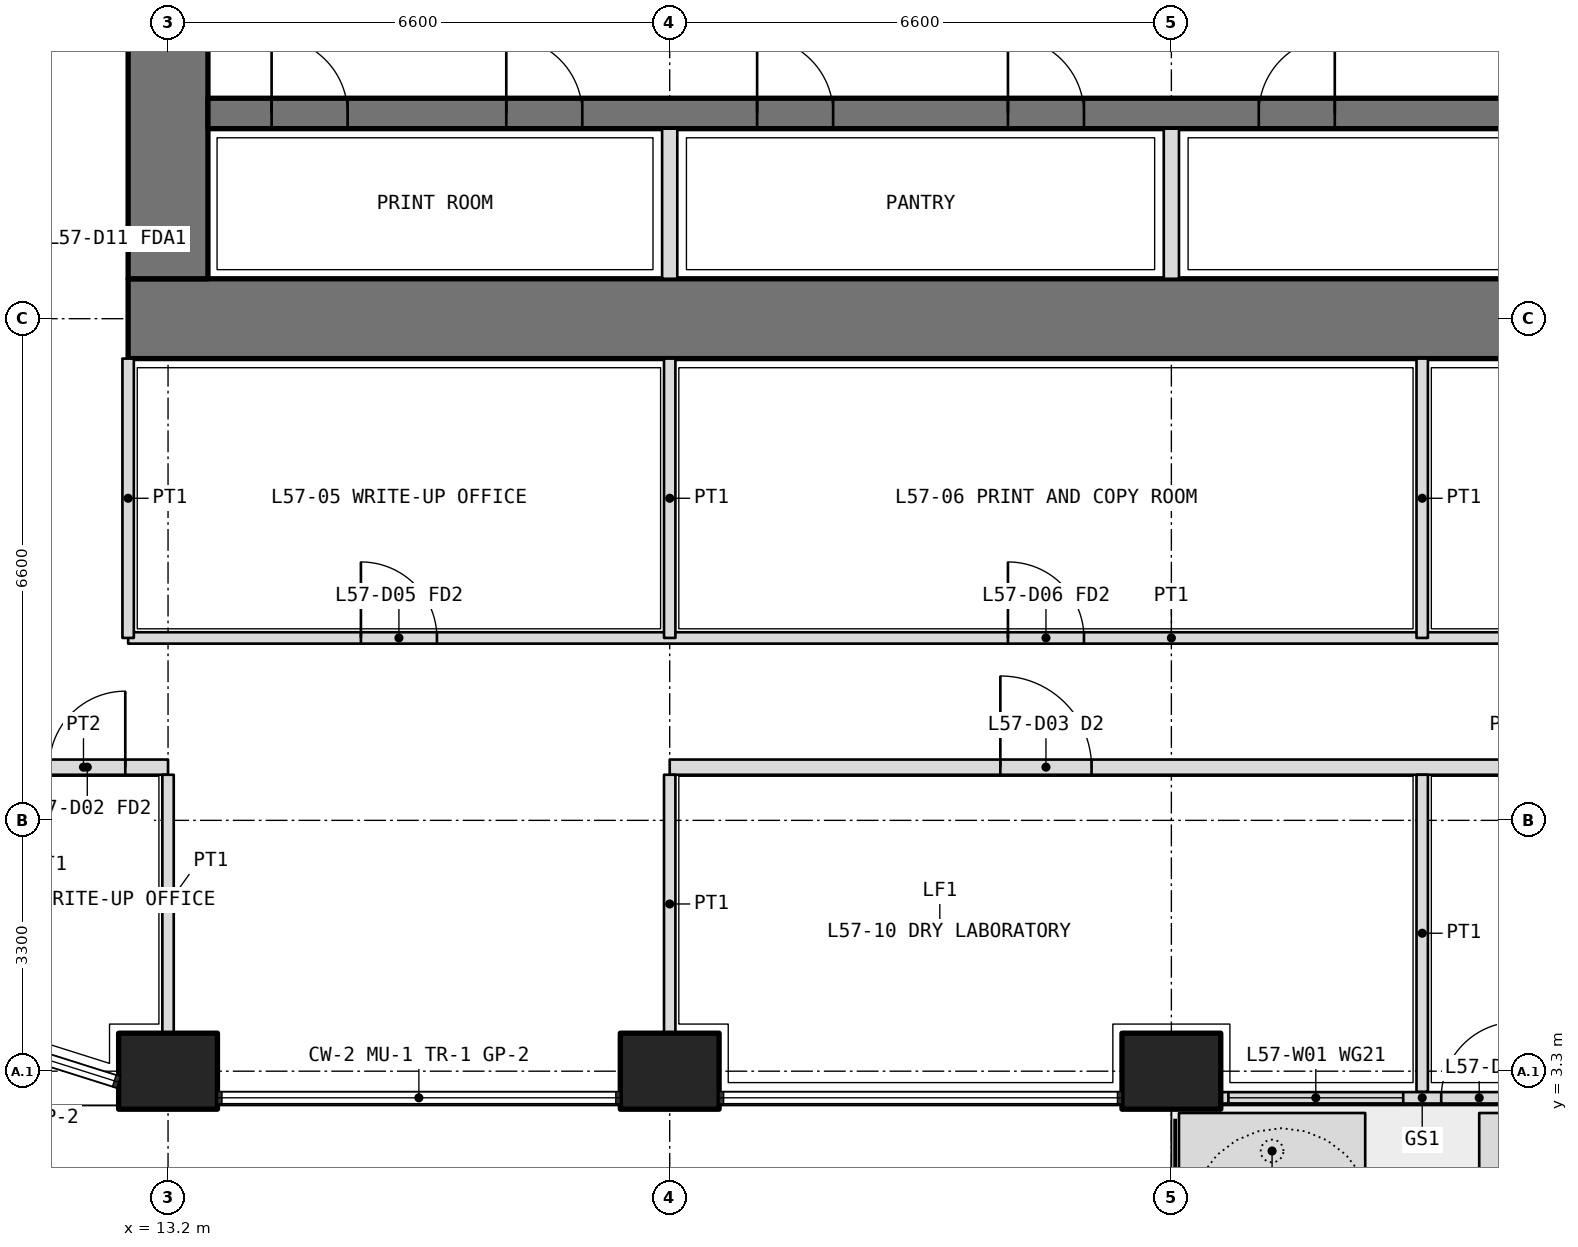
"""IFC4 building model, lengths in metres.
Left out: names, types, materials, properties, quantities, classifications, styles, units other than length and angle.
Written with IfcOpenShell. Run it as: python <this file> out.ifc"""

import sys

from ifc_helpers import new_model, si_unit, direction, frame, frame_2d, origin, origin_2d, place, context, subcontext, project, spatial, polyline, rectangle, outline, extrude, element, fill, save


model = new_model("IFC4")
c1 = context("Model", 3, precision=1e-05, world=origin(), true_north=direction((0.0, 1.0)))
c2 = subcontext(c1, "Body", "Model", "MODEL_VIEW")
j1 = project(units=[si_unit("LENGTHUNIT", "METRE"), si_unit("PLANEANGLEUNIT", "RADIAN")], contexts=[c1])
p1 = place(None, origin())
s1 = spatial("IfcSite", under=j1, at=p1, CompositionType="ELEMENT")
p2 = place(p1, origin())
s2 = spatial("IfcBuilding", under=s1, at=p2, CompositionType="ELEMENT")
p3 = place(p2, frame((0.0, 0.0, 250.2)))
s3 = spatial("IfcBuildingStorey", under=s2, at=p3, CompositionType="ELEMENT", Elevation=250.2)
for number, where, z_axis, x_axis in (
    (1, (13.2, 3.3, 0.0), (0.0, 0.0, 1.0), (1.0, 0.0, 0.0)),
    (2, (19.8, 3.3, 0.0), (0.0, 0.0, 1.0), (1.0, 0.0, 0.0)),
    (3, (26.4, 3.3, 0.0), (0.0, 0.0, 1.0), (1.0, 0.0, 0.0)),
):
    element("IfcColumn", number, at=place(p3, frame(where, z_axis=z_axis, x_axis=x_axis)), inside=s3, PredefinedType="COLUMN", context=c2, shape_type="SweptSolid", body=[
        extrude(rectangle(XDim=1.3, YDim=1.0, at=origin_2d()), origin(), (0.0, 0.0, 1.0), 4.2),
    ])
p4 = place(p3, origin())
e4 = element("IfcWall", 4, at=p4, inside=s3, PredefinedType="USERDEFINED", context=c2, shape_type="SweptSolid", body=[
    extrude(outline(polyline([(26.5, 1.75), (28.95, 1.75), (28.95, 2.75), (26.5, 2.75), (26.5, 1.75)]), holes=[polyline([(26.65, 1.9), (28.8, 1.9), (28.8, 2.6), (26.65, 2.6), (26.65, 1.9)])]), origin(), (0.0, 0.0, 1.0), 1.05),
])
p5 = place(p3, origin())
e5 = element("IfcWall", 5, at=p5, inside=s3, PredefinedType="USERDEFINED", context=c2, shape_type="SweptSolid", body=[
    extrude(outline(polyline([(30.45, 1.75), (39.5, 1.75), (39.5, 2.75), (30.45, 2.75), (30.45, 1.75)]), holes=[polyline([(30.6, 1.9), (39.35, 1.9), (39.35, 2.6), (30.6, 2.6), (30.6, 1.9)])]), origin(), (0.0, 0.0, 1.0), 1.05),
])
p6 = place(p3, frame((27.05, 2.95, 0.0), z_axis=(0.0, 0.0, 1.0), x_axis=(1.0, 0.0, 0.0)))
e6 = element("IfcWall", 6, at=p6, inside=s3, PredefinedType="SOLIDWALL", context=c2, shape_type="SweptSolid", body=[
    extrude(rectangle(XDim=5.3, YDim=0.15, at=frame_2d((2.65, 0.0))), origin(), (0.0, 0.0, 1.0), 2.7),
])
p7 = place(p6, frame((2.9, 0.0, 0.0)))
e7 = element("IfcOpeningElement", 7, at=p7, cuts=e6, PredefinedType="OPENING", context=c2, shape_type="SweptSolid", body=[
    extrude(rectangle(XDim=1.0, YDim=2.4, at=frame_2d((0.5, 1.2))), frame((0.0, 0.085, 0.0), z_axis=(0.0, -1.0, 0.0), x_axis=(1.0, 0.0, 0.0)), (0.0, 0.0, 1.0), 0.17),
])
p8 = place(p6, frame((0.1, 0.0, 0.1)))
e8 = element("IfcOpeningElement", 8, at=p8, cuts=e6, PredefinedType="OPENING", context=c2, shape_type="SweptSolid", body=[
    extrude(rectangle(XDim=2.3, YDim=2.3, at=frame_2d((1.15, 1.15))), frame((0.0, 0.085, 0.0), z_axis=(0.0, -1.0, 0.0), x_axis=(1.0, 0.0, 0.0)), (0.0, 0.0, 1.0), 0.17),
])
p9 = place(p6, frame((4.0, 0.0, 0.1)))
e9 = element("IfcOpeningElement", 9, at=p9, cuts=e6, PredefinedType="OPENING", context=c2, shape_type="SweptSolid", body=[
    extrude(rectangle(XDim=1.2, YDim=2.3, at=frame_2d((0.6, 1.15))), frame((0.0, 0.085, 0.0), z_axis=(0.0, -1.0, 0.0), x_axis=(1.0, 0.0, 0.0)), (0.0, 0.0, 1.0), 0.17),
])
p10 = place(p3, frame((12.675, 13.2, 0.0), z_axis=(0.0, 0.0, 1.0), x_axis=(1.0, 0.0, 0.0)))
e10 = element("IfcWall", 10, at=p10, inside=s3, PredefinedType="SHEAR", context=c2, shape_type="SweptSolid", body=[
    extrude(rectangle(XDim=27.45, YDim=1.05, at=frame_2d((13.725, 0.0))), origin(), (0.0, 0.0, 1.0), 4.2),
])
p11 = place(p3, frame((13.2, 32.475, 0.0), z_axis=(0.0, 0.0, 1.0), x_axis=(0.0, -1.0, 0.0)))
e11 = element("IfcWall", 11, at=p11, inside=s3, PredefinedType="SHEAR", context=c2, shape_type="SweptSolid", body=[
    extrude(rectangle(XDim=18.75, YDim=1.05, at=frame_2d((9.375, 0.0))), origin(), (0.0, 0.0, 1.0), 4.2),
])
p12 = place(p11, frame((14.125, 0.0, 0.0)))
e12 = element("IfcOpeningElement", 12, at=p12, cuts=e11, PredefinedType="OPENING", context=c2, shape_type="SweptSolid", body=[
    extrude(rectangle(XDim=1.6, YDim=2.1, at=frame_2d((0.8, 1.05))), frame((0.0, 0.535, 0.0), z_axis=(0.0, -1.0, 0.0), x_axis=(1.0, 0.0, 0.0)), (0.0, 0.0, 1.0), 1.07),
])
p13 = place(p11, frame((3.325, 0.0, 0.0)))
e13 = element("IfcOpeningElement", 13, at=p13, cuts=e11, PredefinedType="OPENING", context=c2, shape_type="SweptSolid", body=[
    extrude(rectangle(XDim=1.6, YDim=2.1, at=frame_2d((0.8, 1.05))), frame((0.0, 0.535, 0.0), z_axis=(0.0, -1.0, 0.0), x_axis=(1.0, 0.0, 0.0)), (0.0, 0.0, 1.0), 1.07),
])
p14 = place(p3, frame((13.725, 15.9, 0.0), z_axis=(0.0, 0.0, 1.0), x_axis=(1.0, 0.0, 0.0)))
e14 = element("IfcWall", 14, at=p14, inside=s3, PredefinedType="SHEAR", context=c2, shape_type="SweptSolid", body=[
    extrude(rectangle(XDim=25.35, YDim=0.4, at=frame_2d((12.675, 0.0))), origin(), (0.0, 0.0, 1.0), 4.2),
])
p15 = place(p14, frame((0.837, 0.0, 0.0)))
e15 = element("IfcOpeningElement", 15, at=p15, cuts=e14, PredefinedType="OPENING", context=c2, shape_type="SweptSolid", body=[
    extrude(rectangle(XDim=1.0, YDim=2.1, at=frame_2d((0.5, 1.05))), frame((0.0, 0.21, 0.0), z_axis=(0.0, -1.0, 0.0), x_axis=(1.0, 0.0, 0.0)), (0.0, 0.0, 1.0), 0.42),
])
p16 = place(p14, frame((3.925, 0.0, 0.0)))
e16 = element("IfcOpeningElement", 16, at=p16, cuts=e14, PredefinedType="OPENING", context=c2, shape_type="SweptSolid", body=[
    extrude(rectangle(XDim=1.0, YDim=2.1, at=frame_2d((0.5, 1.05))), frame((0.0, 0.21, 0.0), z_axis=(0.0, -1.0, 0.0), x_axis=(1.0, 0.0, 0.0)), (0.0, 0.0, 1.0), 0.42),
])
p17 = place(p14, frame((7.225, 0.0, 0.0)))
e17 = element("IfcOpeningElement", 17, at=p17, cuts=e14, PredefinedType="OPENING", context=c2, shape_type="SweptSolid", body=[
    extrude(rectangle(XDim=1.0, YDim=2.1, at=frame_2d((0.5, 1.05))), frame((0.0, 0.21, 0.0), z_axis=(0.0, -1.0, 0.0), x_axis=(1.0, 0.0, 0.0)), (0.0, 0.0, 1.0), 0.42),
])
p18 = place(p14, frame((10.525, 0.0, 0.0)))
e18 = element("IfcOpeningElement", 18, at=p18, cuts=e14, PredefinedType="OPENING", context=c2, shape_type="SweptSolid", body=[
    extrude(rectangle(XDim=1.0, YDim=2.1, at=frame_2d((0.5, 1.05))), frame((0.0, 0.21, 0.0), z_axis=(0.0, -1.0, 0.0), x_axis=(1.0, 0.0, 0.0)), (0.0, 0.0, 1.0), 0.42),
])
p19 = place(p14, frame((13.825, 0.0, 0.0)))
e19 = element("IfcOpeningElement", 19, at=p19, cuts=e14, PredefinedType="OPENING", context=c2, shape_type="SweptSolid", body=[
    extrude(rectangle(XDim=1.0, YDim=2.1, at=frame_2d((0.5, 1.05))), frame((0.0, 0.21, 0.0), z_axis=(0.0, -1.0, 0.0), x_axis=(1.0, 0.0, 0.0)), (0.0, 0.0, 1.0), 0.42),
])
p20 = place(p14, frame((17.125, 0.0, 0.0)))
e20 = element("IfcOpeningElement", 20, at=p20, cuts=e14, PredefinedType="OPENING", context=c2, shape_type="SweptSolid", body=[
    extrude(rectangle(XDim=1.0, YDim=2.1, at=frame_2d((0.5, 1.05))), frame((0.0, 0.21, 0.0), z_axis=(0.0, -1.0, 0.0), x_axis=(1.0, 0.0, 0.0)), (0.0, 0.0, 1.0), 0.42),
])
p21 = place(p14, frame((20.425, 0.0, 0.0)))
e21 = element("IfcOpeningElement", 21, at=p21, cuts=e14, PredefinedType="OPENING", context=c2, shape_type="SweptSolid", body=[
    extrude(rectangle(XDim=1.0, YDim=2.1, at=frame_2d((0.5, 1.05))), frame((0.0, 0.21, 0.0), z_axis=(0.0, -1.0, 0.0), x_axis=(1.0, 0.0, 0.0)), (0.0, 0.0, 1.0), 0.42),
])
p22 = place(p14, frame((23.512, 0.0, 0.0)))
e22 = element("IfcOpeningElement", 22, at=p22, cuts=e14, PredefinedType="OPENING", context=c2, shape_type="SweptSolid", body=[
    extrude(rectangle(XDim=1.0, YDim=2.1, at=frame_2d((0.5, 1.05))), frame((0.0, 0.21, 0.0), z_axis=(0.0, -1.0, 0.0), x_axis=(1.0, 0.0, 0.0)), (0.0, 0.0, 1.0), 0.42),
])
for number, where, z_axis, x_axis in (
    (23, (19.8, 13.725, 0.0), (0.0, 0.0, 1.0), (0.0, 1.0, 0.0)),
    (24, (26.4, 13.725, 0.0), (0.0, 0.0, 1.0), (0.0, 1.0, 0.0)),
):
    element("IfcWall", number, at=place(p3, frame(where, z_axis=z_axis, x_axis=x_axis)), inside=s3, PredefinedType="PARTITIONING", context=c2, shape_type="SweptSolid", body=[
        extrude(rectangle(XDim=1.975, YDim=0.2, at=frame_2d((0.987, 0.0))), origin(), (0.0, 0.0, 1.0), 4.2),
    ])
p23 = place(p3, frame((12.675, 9.0, 0.0), z_axis=(0.0, 0.0, 1.0), x_axis=(1.0, 0.0, 0.0)))
e25 = element("IfcWall", 25, at=p23, inside=s3, PredefinedType="PARTITIONING", context=c2, shape_type="SweptSolid", body=[
    extrude(rectangle(XDim=27.45, YDim=0.15, at=frame_2d((13.725, 0.0))), origin(), (0.0, 0.0, 1.0), 3.0),
])
p24 = place(p23, frame((3.062, 0.0, 0.0)))
e26 = element("IfcOpeningElement", 26, at=p24, cuts=e25, PredefinedType="OPENING", context=c2, shape_type="SweptSolid", body=[
    extrude(rectangle(XDim=1.0, YDim=2.1, at=frame_2d((0.5, 1.05))), frame((0.0, 0.085, 0.0), z_axis=(0.0, -1.0, 0.0), x_axis=(1.0, 0.0, 0.0)), (0.0, 0.0, 1.0), 0.17),
])
p25 = place(p23, frame((11.575, 0.0, 0.0)))
e27 = element("IfcOpeningElement", 27, at=p25, cuts=e25, PredefinedType="OPENING", context=c2, shape_type="SweptSolid", body=[
    extrude(rectangle(XDim=1.0, YDim=2.1, at=frame_2d((0.5, 1.05))), frame((0.0, 0.085, 0.0), z_axis=(0.0, -1.0, 0.0), x_axis=(1.0, 0.0, 0.0)), (0.0, 0.0, 1.0), 0.17),
])
p26 = place(p23, frame((19.825, 0.0, 0.0)))
e28 = element("IfcOpeningElement", 28, at=p26, cuts=e25, PredefinedType="OPENING", context=c2, shape_type="SweptSolid", body=[
    extrude(rectangle(XDim=1.0, YDim=2.1, at=frame_2d((0.5, 1.05))), frame((0.0, 0.085, 0.0), z_axis=(0.0, -1.0, 0.0), x_axis=(1.0, 0.0, 0.0)), (0.0, 0.0, 1.0), 0.17),
])
p27 = place(p23, frame((25.038, 0.0, 0.0)))
e29 = element("IfcOpeningElement", 29, at=p27, cuts=e25, PredefinedType="OPENING", context=c2, shape_type="SweptSolid", body=[
    extrude(rectangle(XDim=1.0, YDim=2.1, at=frame_2d((0.5, 1.05))), frame((0.0, 0.085, 0.0), z_axis=(0.0, -1.0, 0.0), x_axis=(1.0, 0.0, 0.0)), (0.0, 0.0, 1.0), 0.17),
])
for number, where, z_axis, x_axis in (
    (30, (12.675, 12.675, 0.0), (0.0, 0.0, 1.0), (0.0, -1.0, 0.0)),
    (31, (19.8, 12.675, 0.0), (0.0, 0.0, 1.0), (0.0, -1.0, 0.0)),
):
    element("IfcWall", number, at=place(p3, frame(where, z_axis=z_axis, x_axis=x_axis)), inside=s3, PredefinedType="PARTITIONING", context=c2, shape_type="SweptSolid", body=[
        extrude(rectangle(XDim=3.675, YDim=0.15, at=frame_2d((1.837, 0.0))), origin(), (0.0, 0.0, 1.0), 3.0),
    ])
p28 = place(p3, frame((29.7, 12.675, 0.0), z_axis=(0.0, 0.0, 1.0), x_axis=(0.0, -1.0, 0.0)))
e32 = element("IfcWall", 32, at=p28, inside=s3, PredefinedType="PARTITIONING", context=c2, shape_type="SweptSolid", body=[
    extrude(rectangle(XDim=3.675, YDim=0.15, at=frame_2d((1.837, 0.0))), origin(), (0.0, 0.0, 1.0), 3.9),
])
p29 = place(p3, frame((10.975, 7.3, 0.0), z_axis=(0.0, 0.0, 1.0), x_axis=(1.0, 0.0, 0.0)))
e33 = element("IfcWall", 33, at=p29, inside=s3, PredefinedType="PARTITIONING", context=c2, shape_type="SweptSolid", body=[
    extrude(rectangle(XDim=2.225, YDim=0.2, at=frame_2d((1.112, 0.0))), origin(), (0.0, 0.0, 1.0), 3.0),
])
p30 = place(p29, frame((0.663, 0.0, 0.0)))
e34 = element("IfcOpeningElement", 34, at=p30, cuts=e33, PredefinedType="OPENING", context=c2, shape_type="SweptSolid", body=[
    extrude(rectangle(XDim=1.0, YDim=2.1, at=frame_2d((0.5, 1.05))), frame((0.0, 0.11, 0.0), z_axis=(0.0, -1.0, 0.0), x_axis=(1.0, 0.0, 0.0)), (0.0, 0.0, 1.0), 0.22),
])
p31 = place(p3, frame((19.8, 7.3, 0.0), z_axis=(0.0, 0.0, 1.0), x_axis=(1.0, 0.0, 0.0)))
e35 = element("IfcWall", 35, at=p31, inside=s3, PredefinedType="PARTITIONING", context=c2, shape_type="SweptSolid", body=[
    extrude(rectangle(XDim=22.025, YDim=0.2, at=frame_2d((11.012, 0.0))), origin(), (0.0, 0.0, 1.0), 3.0),
])
p32 = place(p31, frame((4.35, 0.0, 0.0)))
e36 = element("IfcOpeningElement", 36, at=p32, cuts=e35, PredefinedType="OPENING", context=c2, shape_type="SweptSolid", body=[
    extrude(rectangle(XDim=1.2, YDim=2.1, at=frame_2d((0.6, 1.05))), frame((0.0, 0.11, 0.0), z_axis=(0.0, -1.0, 0.0), x_axis=(1.0, 0.0, 0.0)), (0.0, 0.0, 1.0), 0.22),
])
p33 = place(p31, frame((15.413, 0.0, 0.0)))
e37 = element("IfcOpeningElement", 37, at=p33, cuts=e35, PredefinedType="OPENING", context=c2, shape_type="SweptSolid", body=[
    extrude(rectangle(XDim=1.0, YDim=2.1, at=frame_2d((0.5, 1.05))), frame((0.0, 0.11, 0.0), z_axis=(0.0, -1.0, 0.0), x_axis=(1.0, 0.0, 0.0)), (0.0, 0.0, 1.0), 0.22),
])
for number, where, z_axis, x_axis in (
    (38, (13.2, 3.8, 0.0), (0.0, 0.0, 1.0), (0.0, 1.0, 0.0)),
    (39, (19.8, 3.8, 0.0), (0.0, 0.0, 1.0), (0.0, 1.0, 0.0)),
):
    element("IfcWall", number, at=place(p3, frame(where, z_axis=z_axis, x_axis=x_axis)), inside=s3, PredefinedType="PARTITIONING", context=c2, shape_type="SweptSolid", body=[
        extrude(rectangle(XDim=3.4, YDim=0.15, at=frame_2d((1.7, 0.0))), origin(), (0.0, 0.0, 1.0), 3.0),
    ])
p34 = place(p3, frame((29.7, 3.03, 0.0), z_axis=(0.0, 0.0, 1.0), x_axis=(0.0, 1.0, 0.0)))
e40 = element("IfcWall", 40, at=p34, inside=s3, PredefinedType="PARTITIONING", context=c2, shape_type="SweptSolid", body=[
    extrude(rectangle(XDim=4.17, YDim=0.15, at=frame_2d((2.085, 0.0))), origin(), (0.0, 0.0, 1.0), 2.7),
])
p35 = place(p7, origin())
e41 = element("IfcDoor", 41, at=p35, inside=s3, OperationType="SINGLE_SWING_RIGHT", PredefinedType="DOOR", context=c2, shape_type="SweptSolid", body=[
    extrude(rectangle(XDim=1.0, YDim=2.4, at=frame_2d((0.5, 1.2))), frame((0.0, 0.025, 0.0), z_axis=(0.0, -1.0, 0.0), x_axis=(1.0, 0.0, 0.0)), (0.0, 0.0, 1.0), 0.05),
])
fill(e7, e41)
p36 = place(p8, origin())
e42 = element("IfcWindow", 42, at=p36, inside=s3, PartitioningType="SINGLE_PANEL", PredefinedType="WINDOW", context=c2, shape_type="SweptSolid", body=[
    extrude(rectangle(XDim=2.3, YDim=2.3, at=frame_2d((1.15, 1.15))), frame((0.0, 0.03, 0.0), z_axis=(0.0, -1.0, 0.0), x_axis=(1.0, 0.0, 0.0)), (0.0, 0.0, 1.0), 0.06),
])
fill(e8, e42)
p37 = place(p24, origin())
e43 = element("IfcDoor", 43, at=p37, inside=s3, OperationType="SINGLE_SWING_LEFT", PredefinedType="DOOR", context=c2, shape_type="SweptSolid", body=[
    extrude(rectangle(XDim=1.0, YDim=2.1, at=frame_2d((0.5, 1.05))), frame((0.0, 0.025, 0.0), z_axis=(0.0, -1.0, 0.0), x_axis=(1.0, 0.0, 0.0)), (0.0, 0.0, 1.0), 0.05),
])
fill(e26, e43)
p38 = place(p25, origin())
e44 = element("IfcDoor", 44, at=p38, inside=s3, OperationType="SINGLE_SWING_LEFT", PredefinedType="DOOR", context=c2, shape_type="SweptSolid", body=[
    extrude(rectangle(XDim=1.0, YDim=2.1, at=frame_2d((0.5, 1.05))), frame((0.0, 0.025, 0.0), z_axis=(0.0, -1.0, 0.0), x_axis=(1.0, 0.0, 0.0)), (0.0, 0.0, 1.0), 0.05),
])
fill(e27, e44)
p39 = place(p30, origin())
e45 = element("IfcDoor", 45, at=p39, inside=s3, OperationType="SINGLE_SWING_RIGHT", PredefinedType="DOOR", context=c2, shape_type="SweptSolid", body=[
    extrude(rectangle(XDim=1.0, YDim=2.1, at=frame_2d((0.5, 1.05))), frame((0.0, 0.025, 0.0), z_axis=(0.0, -1.0, 0.0), x_axis=(1.0, 0.0, 0.0)), (0.0, 0.0, 1.0), 0.05),
])
fill(e34, e45)
p40 = place(p32, origin())
e46 = element("IfcDoor", 46, at=p40, inside=s3, OperationType="DOUBLE_DOOR_SINGLE_SWING", PredefinedType="DOOR", context=c2, shape_type="SweptSolid", body=[
    extrude(rectangle(XDim=1.2, YDim=2.1, at=frame_2d((0.6, 1.05))), frame((0.0, 0.025, 0.0), z_axis=(0.0, -1.0, 0.0), x_axis=(1.0, 0.0, 0.0)), (0.0, 0.0, 1.0), 0.05),
])
fill(e36, e46)
p41 = place(p15, origin())
e47 = element("IfcDoor", 47, at=p41, inside=s3, OperationType="SINGLE_SWING_LEFT", PredefinedType="DOOR", context=c2, shape_type="SweptSolid", body=[
    extrude(rectangle(XDim=1.0, YDim=2.1, at=frame_2d((0.5, 1.05))), frame((0.0, 0.025, 0.0), z_axis=(0.0, -1.0, 0.0), x_axis=(1.0, 0.0, 0.0)), (0.0, 0.0, 1.0), 0.05),
])
fill(e15, e47)
p42 = place(p16, origin())
e48 = element("IfcDoor", 48, at=p42, inside=s3, OperationType="SINGLE_SWING_LEFT", PredefinedType="DOOR", context=c2, shape_type="SweptSolid", body=[
    extrude(rectangle(XDim=1.0, YDim=2.1, at=frame_2d((0.5, 1.05))), frame((0.0, 0.025, 0.0), z_axis=(0.0, -1.0, 0.0), x_axis=(1.0, 0.0, 0.0)), (0.0, 0.0, 1.0), 0.05),
])
fill(e16, e48)
p43 = place(p17, origin())
e49 = element("IfcDoor", 49, at=p43, inside=s3, OperationType="SINGLE_SWING_LEFT", PredefinedType="DOOR", context=c2, shape_type="SweptSolid", body=[
    extrude(rectangle(XDim=1.0, YDim=2.1, at=frame_2d((0.5, 1.05))), frame((0.0, 0.025, 0.0), z_axis=(0.0, -1.0, 0.0), x_axis=(1.0, 0.0, 0.0)), (0.0, 0.0, 1.0), 0.05),
])
fill(e17, e49)
p44 = place(p18, origin())
e50 = element("IfcDoor", 50, at=p44, inside=s3, OperationType="SINGLE_SWING_LEFT", PredefinedType="DOOR", context=c2, shape_type="SweptSolid", body=[
    extrude(rectangle(XDim=1.0, YDim=2.1, at=frame_2d((0.5, 1.05))), frame((0.0, 0.025, 0.0), z_axis=(0.0, -1.0, 0.0), x_axis=(1.0, 0.0, 0.0)), (0.0, 0.0, 1.0), 0.05),
])
fill(e18, e50)
p45 = place(p19, origin())
e51 = element("IfcDoor", 51, at=p45, inside=s3, OperationType="SINGLE_SWING_RIGHT", PredefinedType="DOOR", context=c2, shape_type="SweptSolid", body=[
    extrude(rectangle(XDim=1.0, YDim=2.1, at=frame_2d((0.5, 1.05))), frame((0.0, 0.025, 0.0), z_axis=(0.0, -1.0, 0.0), x_axis=(1.0, 0.0, 0.0)), (0.0, 0.0, 1.0), 0.05),
])
fill(e19, e51)
save(model, sys.argv[1])
